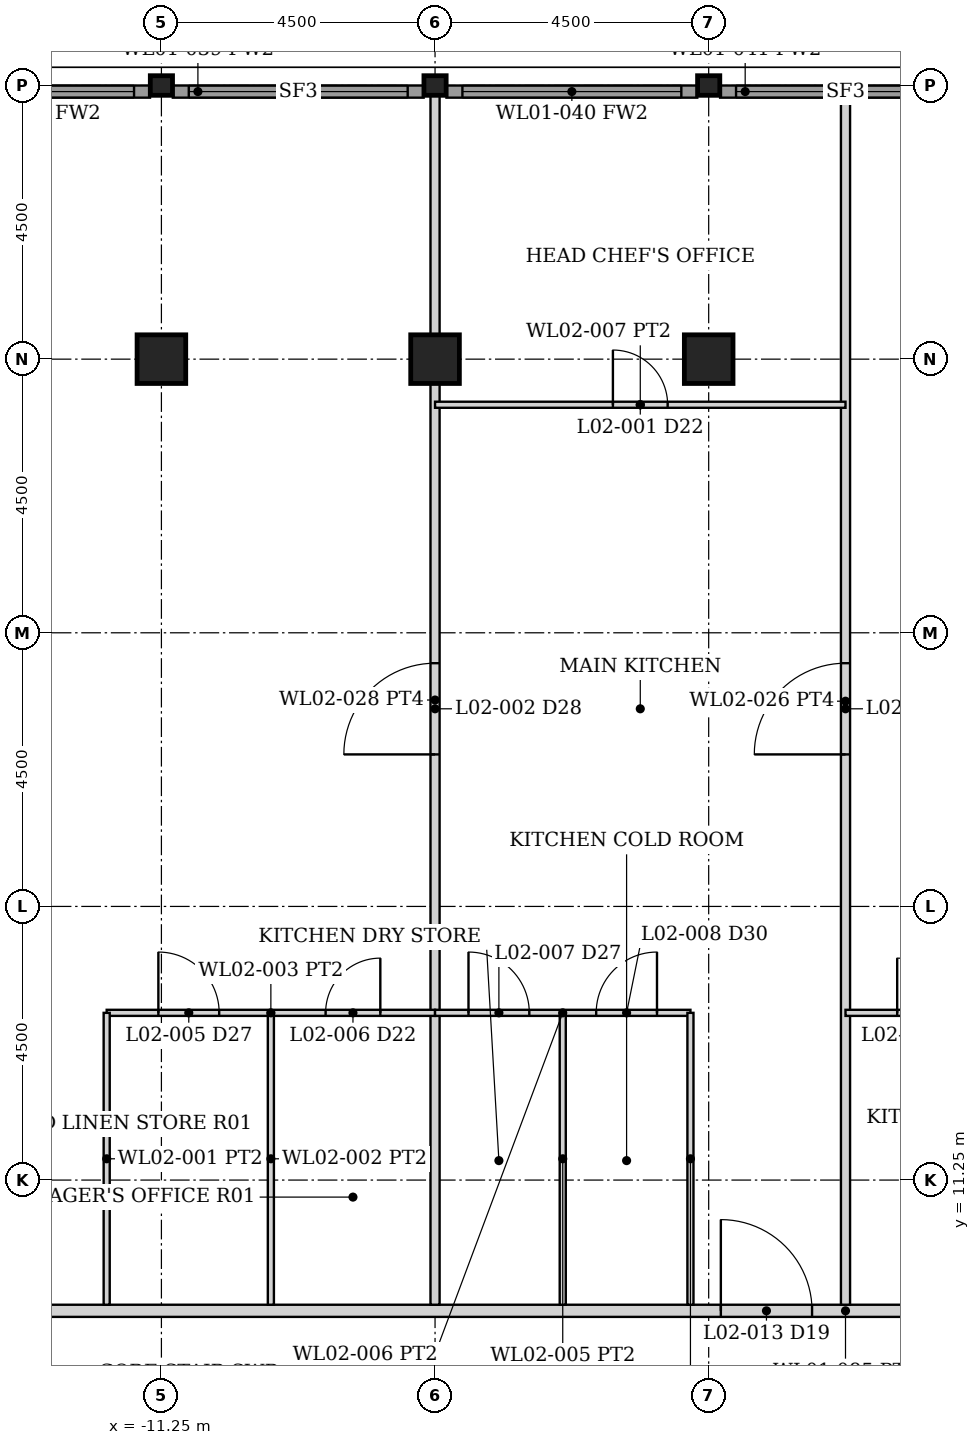
"""IFC4 building model, lengths in metres.
Left out: names, types, materials, properties, quantities, classifications, styles, units other than length and angle.
Written with IfcOpenShell. Run it as: python <this file> out.ifc"""

import sys

from ifc_helpers import new_model, si_unit, direction, frame, frame_2d, origin, origin_2d, place, context, subcontext, project, spatial, rectangle, hollow_rectangle, i_section, extrude, element, fill, save


model = new_model("IFC4")
c1 = context("Model", 3, precision=1e-05, world=origin(), true_north=direction((0.0, 1.0)))
c2 = subcontext(c1, "Body", "Model", "MODEL_VIEW")
j1 = project(units=[si_unit("LENGTHUNIT", "METRE"), si_unit("PLANEANGLEUNIT", "RADIAN")], contexts=[c1])
p1 = place(None, origin())
s1 = spatial("IfcSite", under=j1, at=p1, CompositionType="ELEMENT")
p2 = place(p1, origin())
s2 = spatial("IfcBuilding", under=s1, at=p2, CompositionType="ELEMENT")
p3 = place(p2, frame((0.0, 0.0, 11.0)))
s3 = spatial("IfcBuildingStorey", under=s2, at=p3, CompositionType="ELEMENT", Elevation=11.0)
for number, where, z_axis, x_axis in (
    (1, (-11.25, 24.75, 0.0), (0.0, 0.0, 1.0), (0.0, 1.0, 0.0)),
    (2, (-6.75, 24.75, 0.0), (0.0, 0.0, 1.0), (0.0, 1.0, 0.0)),
    (3, (-2.25, 24.75, 0.0), (0.0, 0.0, 1.0), (0.0, 1.0, 0.0)),
):
    element("IfcColumn", number, at=place(p3, frame(where, z_axis=z_axis, x_axis=x_axis)), inside=s3, PredefinedType="COLUMN", context=c2, shape_type="SweptSolid", body=[
        extrude(hollow_rectangle(XDim=0.8, YDim=0.8, WallThickness=0.08, at=origin_2d()), origin(), (0.0, 0.0, 1.0), 5.0),
    ])
for number, where, z_axis, x_axis in (
    (4, (-11.25, 29.25, 0.0), (0.0, 0.0, 1.0), (0.0, 1.0, 0.0)),
    (5, (-6.75, 29.25, 0.0), (0.0, 0.0, 1.0), (0.0, 1.0, 0.0)),
    (6, (-2.25, 29.25, 0.0), (0.0, 0.0, 1.0), (0.0, 1.0, 0.0)),
):
    element("IfcColumn", number, at=place(p3, frame(where, z_axis=z_axis, x_axis=x_axis)), inside=s3, PredefinedType="COLUMN", context=c2, shape_type="SweptSolid", body=[
        extrude(i_section(OverallWidth=0.322, OverallDepth=0.365, WebThickness=0.027, FlangeThickness=0.044, FilletRadius=0.015, at=origin_2d()), origin(), (0.0, 0.0, 1.0), 5.0),
    ])
p4 = place(p3, frame((-15.562, 29.15, 0.0), z_axis=(0.0, 0.0, 1.0), x_axis=(1.0, 0.0, 0.0)))
e7 = element("IfcWall", 7, at=p4, inside=s3, PredefinedType="SOLIDWALL", context=c2, shape_type="SweptSolid", body=[
    extrude(rectangle(XDim=4.125, YDim=0.2, at=frame_2d((2.062, 0.0))), origin(), (0.0, 0.0, 1.0), 4.133),
])
p5 = place(p4, frame((0.262, 0.0, 0.15)))
e8 = element("IfcOpeningElement", 8, at=p5, cuts=e7, PredefinedType="OPENING", context=c2, shape_type="SweptSolid", body=[
    extrude(rectangle(XDim=3.6, YDim=3.833, at=frame_2d((1.8, 1.917))), frame((0.0, 0.11, 0.0), z_axis=(0.0, -1.0, 0.0), x_axis=(1.0, 0.0, 0.0)), (0.0, 0.0, 1.0), 0.22),
])
p6 = place(p3, frame((-11.062, 29.15, 0.0), z_axis=(0.0, 0.0, 1.0), x_axis=(1.0, 0.0, 0.0)))
e9 = element("IfcWall", 9, at=p6, inside=s3, PredefinedType="SOLIDWALL", context=c2, shape_type="SweptSolid", body=[
    extrude(rectangle(XDim=4.125, YDim=0.2, at=frame_2d((2.062, 0.0))), origin(), (0.0, 0.0, 1.0), 4.133),
])
p7 = place(p6, frame((0.262, 0.0, 0.15)))
e10 = element("IfcOpeningElement", 10, at=p7, cuts=e9, PredefinedType="OPENING", context=c2, shape_type="SweptSolid", body=[
    extrude(rectangle(XDim=3.6, YDim=3.833, at=frame_2d((1.8, 1.917))), frame((0.0, 0.11, 0.0), z_axis=(0.0, -1.0, 0.0), x_axis=(1.0, 0.0, 0.0)), (0.0, 0.0, 1.0), 0.22),
])
p8 = place(p3, frame((-6.562, 29.15, 0.0), z_axis=(0.0, 0.0, 1.0), x_axis=(1.0, 0.0, 0.0)))
e11 = element("IfcWall", 11, at=p8, inside=s3, PredefinedType="SOLIDWALL", context=c2, shape_type="SweptSolid", body=[
    extrude(rectangle(XDim=4.125, YDim=0.2, at=frame_2d((2.062, 0.0))), origin(), (0.0, 0.0, 1.0), 4.133),
])
p9 = place(p8, frame((0.262, 0.0, 0.15)))
e12 = element("IfcOpeningElement", 12, at=p9, cuts=e11, PredefinedType="OPENING", context=c2, shape_type="SweptSolid", body=[
    extrude(rectangle(XDim=3.6, YDim=3.833, at=frame_2d((1.8, 1.917))), frame((0.0, 0.11, 0.0), z_axis=(0.0, -1.0, 0.0), x_axis=(1.0, 0.0, 0.0)), (0.0, 0.0, 1.0), 0.22),
])
p10 = place(p3, frame((-2.062, 29.15, 0.0), z_axis=(0.0, 0.0, 1.0), x_axis=(1.0, 0.0, 0.0)))
e13 = element("IfcWall", 13, at=p10, inside=s3, PredefinedType="SOLIDWALL", context=c2, shape_type="SweptSolid", body=[
    extrude(rectangle(XDim=4.125, YDim=0.2, at=frame_2d((2.062, 0.0))), origin(), (0.0, 0.0, 1.0), 4.133),
])
p11 = place(p10, frame((0.262, 0.0, 0.15)))
e14 = element("IfcOpeningElement", 14, at=p11, cuts=e13, PredefinedType="OPENING", context=c2, shape_type="SweptSolid", body=[
    extrude(rectangle(XDim=3.6, YDim=3.833, at=frame_2d((1.8, 1.917))), frame((0.0, 0.11, 0.0), z_axis=(0.0, -1.0, 0.0), x_axis=(1.0, 0.0, 0.0)), (0.0, 0.0, 1.0), 0.22),
])
p12 = place(p3, frame((-25.075, 9.1, 0.0), z_axis=(0.0, 0.0, 1.0), x_axis=(1.0, 0.0, 0.0)))
e15 = element("IfcWall", 15, at=p12, inside=s3, PredefinedType="PARTITIONING", context=c2, shape_type="SweptSolid", body=[
    extrude(rectangle(XDim=50.15, YDim=0.2, at=frame_2d((25.075, 0.0))), origin(), (0.0, 0.0, 1.0), 3.829),
])
p13 = place(p12, frame((6.4, 0.0, 0.0)))
e16 = element("IfcOpeningElement", 16, at=p13, cuts=e15, PredefinedType="OPENING", context=c2, shape_type="SweptSolid", body=[
    extrude(rectangle(XDim=1.8, YDim=2.1, at=frame_2d((0.9, 1.05))), frame((0.0, 0.11, 0.0), z_axis=(0.0, -1.0, 0.0), x_axis=(1.0, 0.0, 0.0)), (0.0, 0.0, 1.0), 0.22),
])
p14 = place(p12, frame((23.025, 0.0, 0.0)))
e17 = element("IfcOpeningElement", 17, at=p14, cuts=e15, PredefinedType="OPENING", context=c2, shape_type="SweptSolid", body=[
    extrude(rectangle(XDim=1.5, YDim=2.1, at=frame_2d((0.75, 1.05))), frame((0.0, 0.11, 0.0), z_axis=(0.0, -1.0, 0.0), x_axis=(1.0, 0.0, 0.0)), (0.0, 0.0, 1.0), 0.22),
])
p15 = place(p12, frame((29.3, 0.0, 0.0)))
e18 = element("IfcOpeningElement", 18, at=p15, cuts=e15, PredefinedType="OPENING", context=c2, shape_type="SweptSolid", body=[
    extrude(rectangle(XDim=0.9, YDim=2.1, at=frame_2d((0.45, 1.05))), frame((0.0, 0.11, 0.0), z_axis=(0.0, -1.0, 0.0), x_axis=(1.0, 0.0, 0.0)), (0.0, 0.0, 1.0), 0.22),
])
p16 = place(p12, frame((41.95, 0.0, 0.0)))
e19 = element("IfcOpeningElement", 19, at=p16, cuts=e15, PredefinedType="OPENING", context=c2, shape_type="SweptSolid", body=[
    extrude(rectangle(XDim=1.8, YDim=2.1, at=frame_2d((0.9, 1.05))), frame((0.0, 0.11, 0.0), z_axis=(0.0, -1.0, 0.0), x_axis=(1.0, 0.0, 0.0)), (0.0, 0.0, 1.0), 0.22),
])
p17 = place(p3, frame((-6.75, 9.2, 0.0), z_axis=(0.0, 0.0, 1.0), x_axis=(0.0, 1.0, 0.0)))
e20 = element("IfcWall", 20, at=p17, inside=s3, PredefinedType="PARTITIONING", context=c2, shape_type="SweptSolid", body=[
    extrude(rectangle(XDim=19.889, YDim=0.15, at=frame_2d((9.944, 0.0))), origin(), (0.0, 0.0, 1.0), 3.829),
])
p18 = place(p17, frame((9.05, 0.0, 0.0)))
e21 = element("IfcOpeningElement", 21, at=p18, cuts=e20, PredefinedType="OPENING", context=c2, shape_type="SweptSolid", body=[
    extrude(rectangle(XDim=1.5, YDim=2.1, at=frame_2d((0.75, 1.05))), frame((0.0, 0.085, 0.0), z_axis=(0.0, -1.0, 0.0), x_axis=(1.0, 0.0, 0.0)), (0.0, 0.0, 1.0), 0.17),
])
p19 = place(p3, frame((0.0, 9.2, 0.0), z_axis=(0.0, 0.0, 1.0), x_axis=(0.0, 1.0, 0.0)))
e22 = element("IfcWall", 22, at=p19, inside=s3, PredefinedType="PARTITIONING", context=c2, shape_type="SweptSolid", body=[
    extrude(rectangle(XDim=19.85, YDim=0.15, at=frame_2d((9.925, 0.0))), origin(), (0.0, 0.0, 1.0), 3.829),
])
p20 = place(p19, frame((9.05, 0.0, 0.0)))
e23 = element("IfcOpeningElement", 23, at=p20, cuts=e22, PredefinedType="OPENING", context=c2, shape_type="SweptSolid", body=[
    extrude(rectangle(XDim=1.5, YDim=2.1, at=frame_2d((0.75, 1.05))), frame((0.0, 0.085, 0.0), z_axis=(0.0, -1.0, 0.0), x_axis=(1.0, 0.0, 0.0)), (0.0, 0.0, 1.0), 0.17),
])
p21 = place(p3, frame((-12.15, 14.0, 0.0), z_axis=(0.0, 0.0, 1.0), x_axis=(1.0, 0.0, 0.0)))
e24 = element("IfcWall", 24, at=p21, inside=s3, PredefinedType="PARTITIONING", context=c2, shape_type="SweptSolid", body=[
    extrude(rectangle(XDim=5.4, YDim=0.1, at=frame_2d((2.7, 0.0))), origin(), (0.0, 0.0, 1.0), 3.829),
])
p22 = place(p21, frame((0.85, 0.0, 0.0)))
e25 = element("IfcOpeningElement", 25, at=p22, cuts=e24, PredefinedType="OPENING", context=c2, shape_type="SweptSolid", body=[
    extrude(rectangle(XDim=1.0, YDim=2.1, at=frame_2d((0.5, 1.05))), frame((0.0, 0.06, 0.0), z_axis=(0.0, -1.0, 0.0), x_axis=(1.0, 0.0, 0.0)), (0.0, 0.0, 1.0), 0.12),
])
p23 = place(p21, frame((3.6, 0.0, 0.0)))
e26 = element("IfcOpeningElement", 26, at=p23, cuts=e24, PredefinedType="OPENING", context=c2, shape_type="SweptSolid", body=[
    extrude(rectangle(XDim=0.9, YDim=2.1, at=frame_2d((0.45, 1.05))), frame((0.0, 0.06, 0.0), z_axis=(0.0, -1.0, 0.0), x_axis=(1.0, 0.0, 0.0)), (0.0, 0.0, 1.0), 0.12),
])
for number, where, z_axis, x_axis in (
    (27, (-12.15, 9.2, 0.0), (0.0, 0.0, 1.0), (0.0, 1.0, 0.0)),
    (28, (-9.45, 9.2, 0.0), (0.0, 0.0, 1.0), (0.0, 1.0, 0.0)),
):
    element("IfcWall", number, at=place(p3, frame(where, z_axis=z_axis, x_axis=x_axis)), inside=s3, PredefinedType="PARTITIONING", context=c2, shape_type="SweptSolid", body=[
        extrude(rectangle(XDim=4.8, YDim=0.1, at=frame_2d((2.4, 0.0))), origin(), (0.0, 0.0, 1.0), 3.829),
    ])
p24 = place(p3, frame((-6.75, 14.0, 0.0), z_axis=(0.0, 0.0, 1.0), x_axis=(1.0, 0.0, 0.0)))
e29 = element("IfcWall", 29, at=p24, inside=s3, PredefinedType="PARTITIONING", context=c2, shape_type="SweptSolid", body=[
    extrude(rectangle(XDim=4.2, YDim=0.1, at=frame_2d((2.1, 0.0))), origin(), (0.0, 0.0, 1.0), 3.829),
])
p25 = place(p24, frame((0.55, 0.0, 0.0)))
e30 = element("IfcOpeningElement", 30, at=p25, cuts=e29, PredefinedType="OPENING", context=c2, shape_type="SweptSolid", body=[
    extrude(rectangle(XDim=1.0, YDim=2.1, at=frame_2d((0.5, 1.05))), frame((0.0, 0.06, 0.0), z_axis=(0.0, -1.0, 0.0), x_axis=(1.0, 0.0, 0.0)), (0.0, 0.0, 1.0), 0.12),
])
p26 = place(p24, frame((2.65, 0.0, 0.0)))
e31 = element("IfcOpeningElement", 31, at=p26, cuts=e29, PredefinedType="OPENING", context=c2, shape_type="SweptSolid", body=[
    extrude(rectangle(XDim=1.0, YDim=2.1, at=frame_2d((0.5, 1.05))), frame((0.0, 0.06, 0.0), z_axis=(0.0, -1.0, 0.0), x_axis=(1.0, 0.0, 0.0)), (0.0, 0.0, 1.0), 0.12),
])
for number, where, z_axis, x_axis in (
    (32, (-4.65, 9.2, 0.0), (0.0, 0.0, 1.0), (0.0, 1.0, 0.0)),
    (33, (-2.55, 9.2, 0.0), (0.0, 0.0, 1.0), (0.0, 1.0, 0.0)),
):
    element("IfcWall", number, at=place(p3, frame(where, z_axis=z_axis, x_axis=x_axis)), inside=s3, PredefinedType="PARTITIONING", context=c2, shape_type="SweptSolid", body=[
        extrude(rectangle(XDim=4.8, YDim=0.1, at=frame_2d((2.4, 0.0))), origin(), (0.0, 0.0, 1.0), 3.829),
    ])
p27 = place(p3, frame((-6.75, 24.0, 0.0), z_axis=(0.0, 0.0, 1.0), x_axis=(1.0, 0.0, 0.0)))
e34 = element("IfcWall", 34, at=p27, inside=s3, PredefinedType="PARTITIONING", context=c2, shape_type="SweptSolid", body=[
    extrude(rectangle(XDim=6.75, YDim=0.1, at=frame_2d((3.375, 0.0))), origin(), (0.0, 0.0, 1.0), 3.829),
])
p28 = place(p27, frame((2.925, 0.0, 0.0)))
e35 = element("IfcOpeningElement", 35, at=p28, cuts=e34, PredefinedType="OPENING", context=c2, shape_type="SweptSolid", body=[
    extrude(rectangle(XDim=0.9, YDim=2.1, at=frame_2d((0.45, 1.05))), frame((0.0, 0.06, 0.0), z_axis=(0.0, -1.0, 0.0), x_axis=(1.0, 0.0, 0.0)), (0.0, 0.0, 1.0), 0.12),
])
p29 = place(p3, frame((0.0, 14.0, 0.0), z_axis=(0.0, 0.0, 1.0), x_axis=(1.0, 0.0, 0.0)))
e36 = element("IfcWall", 36, at=p29, inside=s3, PredefinedType="PARTITIONING", context=c2, shape_type="SweptSolid", body=[
    extrude(rectangle(XDim=2.6, YDim=0.1, at=frame_2d((1.3, 0.0))), origin(), (0.0, 0.0, 1.0), 3.829),
])
p30 = place(p29, frame((0.85, 0.0, 0.0)))
e37 = element("IfcOpeningElement", 37, at=p30, cuts=e36, PredefinedType="OPENING", context=c2, shape_type="SweptSolid", body=[
    extrude(rectangle(XDim=0.9, YDim=2.1, at=frame_2d((0.45, 1.05))), frame((0.0, 0.06, 0.0), z_axis=(0.0, -1.0, 0.0), x_axis=(1.0, 0.0, 0.0)), (0.0, 0.0, 1.0), 0.12),
])
p31 = place(p5, origin())
e38 = element("IfcWindow", 38, at=p31, inside=s3, PartitioningType="SINGLE_PANEL", PredefinedType="WINDOW", context=c2, shape_type="SweptSolid", body=[
    extrude(rectangle(XDim=3.6, YDim=3.833, at=frame_2d((1.8, 1.917))), frame((0.0, 0.03, 0.0), z_axis=(0.0, -1.0, 0.0), x_axis=(1.0, 0.0, 0.0)), (0.0, 0.0, 1.0), 0.06),
])
fill(e8, e38)
p32 = place(p7, origin())
e39 = element("IfcWindow", 39, at=p32, inside=s3, PartitioningType="SINGLE_PANEL", PredefinedType="WINDOW", context=c2, shape_type="SweptSolid", body=[
    extrude(rectangle(XDim=3.6, YDim=3.833, at=frame_2d((1.8, 1.917))), frame((0.0, 0.03, 0.0), z_axis=(0.0, -1.0, 0.0), x_axis=(1.0, 0.0, 0.0)), (0.0, 0.0, 1.0), 0.06),
])
fill(e10, e39)
p33 = place(p9, origin())
e40 = element("IfcWindow", 40, at=p33, inside=s3, PartitioningType="SINGLE_PANEL", PredefinedType="WINDOW", context=c2, shape_type="SweptSolid", body=[
    extrude(rectangle(XDim=3.6, YDim=3.833, at=frame_2d((1.8, 1.917))), frame((0.0, 0.03, 0.0), z_axis=(0.0, -1.0, 0.0), x_axis=(1.0, 0.0, 0.0)), (0.0, 0.0, 1.0), 0.06),
])
fill(e12, e40)
p34 = place(p11, origin())
e41 = element("IfcWindow", 41, at=p34, inside=s3, PartitioningType="SINGLE_PANEL", PredefinedType="WINDOW", context=c2, shape_type="SweptSolid", body=[
    extrude(rectangle(XDim=3.6, YDim=3.833, at=frame_2d((1.8, 1.917))), frame((0.0, 0.03, 0.0), z_axis=(0.0, -1.0, 0.0), x_axis=(1.0, 0.0, 0.0)), (0.0, 0.0, 1.0), 0.06),
])
fill(e14, e41)
p35 = place(p22, origin())
e42 = element("IfcDoor", 42, at=p35, inside=s3, OperationType="SINGLE_SWING_LEFT", PredefinedType="DOOR", context=c2, shape_type="SweptSolid", body=[
    extrude(rectangle(XDim=1.0, YDim=2.1, at=frame_2d((0.5, 1.05))), frame((0.0, 0.025, 0.0), z_axis=(0.0, -1.0, 0.0), x_axis=(1.0, 0.0, 0.0)), (0.0, 0.0, 1.0), 0.05),
])
fill(e25, e42)
p36 = place(p23, origin())
e43 = element("IfcDoor", 43, at=p36, inside=s3, OperationType="SINGLE_SWING_RIGHT", PredefinedType="DOOR", context=c2, shape_type="SweptSolid", body=[
    extrude(rectangle(XDim=0.9, YDim=2.1, at=frame_2d((0.45, 1.05))), frame((0.0, 0.025, 0.0), z_axis=(0.0, -1.0, 0.0), x_axis=(1.0, 0.0, 0.0)), (0.0, 0.0, 1.0), 0.05),
])
fill(e26, e43)
p37 = place(p25, origin())
e44 = element("IfcDoor", 44, at=p37, inside=s3, OperationType="SINGLE_SWING_LEFT", PredefinedType="DOOR", context=c2, shape_type="SweptSolid", body=[
    extrude(rectangle(XDim=1.0, YDim=2.1, at=frame_2d((0.5, 1.05))), frame((0.0, 0.025, 0.0), z_axis=(0.0, -1.0, 0.0), x_axis=(1.0, 0.0, 0.0)), (0.0, 0.0, 1.0), 0.05),
])
fill(e30, e44)
p38 = place(p26, origin())
e45 = element("IfcDoor", 45, at=p38, inside=s3, OperationType="SINGLE_SWING_RIGHT", PredefinedType="DOOR", context=c2, shape_type="SweptSolid", body=[
    extrude(rectangle(XDim=1.0, YDim=2.1, at=frame_2d((0.5, 1.05))), frame((0.0, 0.025, 0.0), z_axis=(0.0, -1.0, 0.0), x_axis=(1.0, 0.0, 0.0)), (0.0, 0.0, 1.0), 0.05),
])
fill(e31, e45)
p39 = place(p28, origin())
e46 = element("IfcDoor", 46, at=p39, inside=s3, OperationType="SINGLE_SWING_LEFT", PredefinedType="DOOR", context=c2, shape_type="SweptSolid", body=[
    extrude(rectangle(XDim=0.9, YDim=2.1, at=frame_2d((0.45, 1.05))), frame((0.0, 0.025, 0.0), z_axis=(0.0, -1.0, 0.0), x_axis=(1.0, 0.0, 0.0)), (0.0, 0.0, 1.0), 0.05),
])
fill(e35, e46)
p40 = place(p14, origin())
e47 = element("IfcDoor", 47, at=p40, inside=s3, OperationType="SINGLE_SWING_LEFT", PredefinedType="DOOR", context=c2, shape_type="SweptSolid", body=[
    extrude(rectangle(XDim=1.5, YDim=2.1, at=frame_2d((0.75, 1.05))), frame((0.0, 0.025, 0.0), z_axis=(0.0, -1.0, 0.0), x_axis=(1.0, 0.0, 0.0)), (0.0, 0.0, 1.0), 0.05),
])
fill(e17, e47)
p41 = place(p30, origin())
e48 = element("IfcDoor", 48, at=p41, inside=s3, OperationType="SINGLE_SWING_LEFT", PredefinedType="DOOR", context=c2, shape_type="SweptSolid", body=[
    extrude(rectangle(XDim=0.9, YDim=2.1, at=frame_2d((0.45, 1.05))), frame((0.0, 0.025, 0.0), z_axis=(0.0, -1.0, 0.0), x_axis=(1.0, 0.0, 0.0)), (0.0, 0.0, 1.0), 0.05),
])
fill(e37, e48)
p42 = place(p18, origin())
e49 = element("IfcDoor", 49, at=p42, inside=s3, OperationType="SINGLE_SWING_LEFT", PredefinedType="DOOR", context=c2, shape_type="SweptSolid", body=[
    extrude(rectangle(XDim=1.5, YDim=2.1, at=frame_2d((0.75, 1.05))), frame((0.0, 0.025, 0.0), z_axis=(0.0, -1.0, 0.0), x_axis=(1.0, 0.0, 0.0)), (0.0, 0.0, 1.0), 0.05),
])
fill(e21, e49)
p43 = place(p20, origin())
e50 = element("IfcDoor", 50, at=p43, inside=s3, OperationType="SINGLE_SWING_LEFT", PredefinedType="DOOR", context=c2, shape_type="SweptSolid", body=[
    extrude(rectangle(XDim=1.5, YDim=2.1, at=frame_2d((0.75, 1.05))), frame((0.0, 0.025, 0.0), z_axis=(0.0, -1.0, 0.0), x_axis=(1.0, 0.0, 0.0)), (0.0, 0.0, 1.0), 0.05),
])
fill(e23, e50)
save(model, sys.argv[1])
